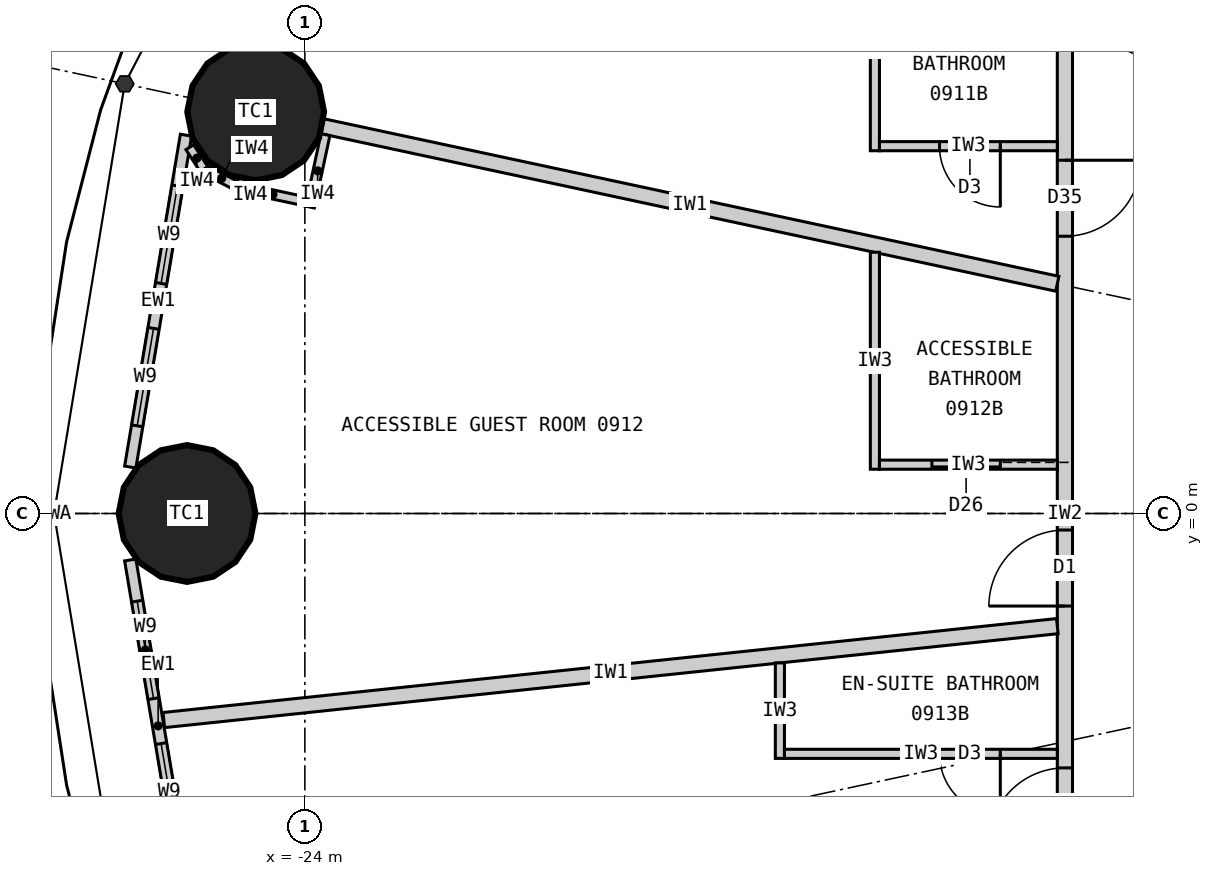
"""IFC4 building model, lengths in metres.
Left out: names, types, materials, properties, quantities, classifications, styles, units other than length and angle.
Written with IfcOpenShell. Run it as: python <this file> out.ifc"""

import sys

from ifc_helpers import new_model, si_unit, direction, frame, frame_2d, origin, origin_2d, place, context, subcontext, project, spatial, rectangle, circle, extrude, element, fill, save


model = new_model("IFC4")
c1 = context("Model", 3, precision=1e-05, world=origin(), true_north=direction((0.0, 1.0)))
c2 = subcontext(c1, "Body", "Model", "MODEL_VIEW")
j1 = project(units=[si_unit("LENGTHUNIT", "METRE"), si_unit("PLANEANGLEUNIT", "RADIAN")], contexts=[c1])
p1 = place(None, origin())
s1 = spatial("IfcSite", under=j1, at=p1, CompositionType="ELEMENT")
p2 = place(p1, origin())
s2 = spatial("IfcBuilding", under=s1, at=p2, CompositionType="ELEMENT")
p3 = place(p2, frame((0.0, 0.0, 42.6)))
s3 = spatial("IfcBuildingStorey", under=s2, at=p3, CompositionType="ELEMENT", Elevation=42.6)
for number, where, z_axis, x_axis in (
    (1, (-24.647, 5.283, 0.0), (0.0, 0.0, 1.0), (1.0, 0.0, 0.0)),
    (2, (-25.55, 0.0, 0.0), (0.0, 0.0, 1.0), (1.0, 0.0, 0.0)),
):
    element("IfcColumn", number, at=place(p3, frame(where, z_axis=z_axis, x_axis=x_axis)), inside=s3, PredefinedType="COLUMN", context=c2, shape_type="SweptSolid", body=[
        extrude(circle(Radius=0.9, at=origin_2d()), origin(), (0.0, 0.0, 1.0), 3.3),
    ])
p4 = place(p3, frame((-25.564, 4.978, 0.0), z_axis=(0.0, 0.0, 1.0), x_axis=(-0.165641751141, -0.986185991727, 0.0)))
e3 = element("IfcWall", 3, at=p4, inside=s3, PredefinedType="ELEMENTEDWALL", context=c2, shape_type="SweptSolid", body=[
    extrude(rectangle(XDim=4.428, YDim=0.15, at=frame_2d((2.214, 0.0))), origin(), (0.0, 0.0, 1.0), 3.05),
])
p5 = place(p4, frame((0.678, 0.0, 0.9)))
e4 = element("IfcOpeningElement", 4, at=p5, cuts=e3, PredefinedType="OPENING", context=c2, shape_type="SweptSolid", body=[
    extrude(rectangle(XDim=1.3, YDim=1.9, at=frame_2d((0.65, 0.95))), frame((0.0, 0.085, 0.0), z_axis=(0.0, -1.0, 0.0), x_axis=(1.0, 0.0, 0.0)), (0.0, 0.0, 1.0), 0.17),
])
p6 = place(p4, frame((2.578, 0.0, 0.9)))
e5 = element("IfcOpeningElement", 5, at=p6, cuts=e3, PredefinedType="OPENING", context=c2, shape_type="SweptSolid", body=[
    extrude(rectangle(XDim=1.3, YDim=1.9, at=frame_2d((0.65, 0.95))), frame((0.0, 0.085, 0.0), z_axis=(0.0, -1.0, 0.0), x_axis=(1.0, 0.0, 0.0)), (0.0, 0.0, 1.0), 0.17),
])
p7 = place(p3, frame((-26.297, -0.611, 0.0), z_axis=(0.0, 0.0, 1.0), x_axis=(0.165641751141, -0.986185991727, 0.0)))
e6 = element("IfcWall", 6, at=p7, inside=s3, PredefinedType="ELEMENTEDWALL", context=c2, shape_type="SweptSolid", body=[
    extrude(rectangle(XDim=4.428, YDim=0.15, at=frame_2d((2.214, 0.0))), origin(), (0.0, 0.0, 1.0), 3.05),
])
p8 = place(p7, frame((0.55, 0.0, 0.9)))
e7 = element("IfcOpeningElement", 7, at=p8, cuts=e6, PredefinedType="OPENING", context=c2, shape_type="SweptSolid", body=[
    extrude(rectangle(XDim=1.3, YDim=1.9, at=frame_2d((0.65, 0.95))), frame((0.0, 0.085, 0.0), z_axis=(0.0, -1.0, 0.0), x_axis=(1.0, 0.0, 0.0)), (0.0, 0.0, 1.0), 0.17),
])
p9 = place(p7, frame((2.45, 0.0, 0.9)))
e8 = element("IfcOpeningElement", 8, at=p9, cuts=e6, PredefinedType="OPENING", context=c2, shape_type="SweptSolid", body=[
    extrude(rectangle(XDim=1.3, YDim=1.9, at=frame_2d((0.65, 0.95))), frame((0.0, 0.085, 0.0), z_axis=(0.0, -1.0, 0.0), x_axis=(1.0, 0.0, 0.0)), (0.0, 0.0, 1.0), 0.17),
])
p10 = place(p3, frame((-14.0, 9.9, 0.0), z_axis=(0.0, 0.0, 1.0), x_axis=(0.0, -1.0, 0.0)))
e9 = element("IfcWall", 9, at=p10, inside=s3, PredefinedType="PARTITIONING", context=c2, shape_type="SweptSolid", body=[
    extrude(rectangle(XDim=19.8, YDim=0.2, at=frame_2d((9.9, 0.0))), origin(), (0.0, 0.0, 1.0), 3.05),
])
p11 = place(p10, frame((0.103, 0.0, 0.0)))
e10 = element("IfcOpeningElement", 10, at=p11, cuts=e9, PredefinedType="OPENING", context=c2, shape_type="SweptSolid", body=[
    extrude(rectangle(XDim=1.0, YDim=2.2, at=frame_2d((0.5, 1.1))), frame((0.0, 0.11, 0.0), z_axis=(0.0, -1.0, 0.0), x_axis=(1.0, 0.0, 0.0)), (0.0, 0.0, 1.0), 0.22),
])
p12 = place(p10, frame((5.252, 0.0, 0.0)))
e11 = element("IfcOpeningElement", 11, at=p12, cuts=e9, PredefinedType="OPENING", context=c2, shape_type="SweptSolid", body=[
    extrude(rectangle(XDim=1.0, YDim=2.0, at=frame_2d((0.5, 1.0))), frame((0.0, 0.11, 0.0), z_axis=(0.0, -1.0, 0.0), x_axis=(1.0, 0.0, 0.0)), (0.0, 0.0, 1.0), 0.22),
])
p13 = place(p10, frame((10.117, 0.0, 0.0)))
e12 = element("IfcOpeningElement", 12, at=p13, cuts=e9, PredefinedType="OPENING", context=c2, shape_type="SweptSolid", body=[
    extrude(rectangle(XDim=1.0, YDim=2.2, at=frame_2d((0.5, 1.1))), frame((0.0, 0.11, 0.0), z_axis=(0.0, -1.0, 0.0), x_axis=(1.0, 0.0, 0.0)), (0.0, 0.0, 1.0), 0.22),
])
p14 = place(p10, frame((13.247, 0.0, 0.0)))
e13 = element("IfcOpeningElement", 13, at=p14, cuts=e9, PredefinedType="OPENING", context=c2, shape_type="SweptSolid", body=[
    extrude(rectangle(XDim=1.0, YDim=2.0, at=frame_2d((0.5, 1.0))), frame((0.0, 0.11, 0.0), z_axis=(0.0, -1.0, 0.0), x_axis=(1.0, 0.0, 0.0)), (0.0, 0.0, 1.0), 0.22),
])
p15 = place(p10, frame((15.679, 0.0, 0.0)))
e14 = element("IfcOpeningElement", 14, at=p15, cuts=e9, PredefinedType="OPENING", context=c2, shape_type="SweptSolid", body=[
    extrude(rectangle(XDim=1.0, YDim=2.2, at=frame_2d((0.5, 1.1))), frame((0.0, 0.11, 0.0), z_axis=(0.0, -1.0, 0.0), x_axis=(1.0, 0.0, 0.0)), (0.0, 0.0, 1.0), 0.22),
])
p16 = place(p3, frame((-14.1, 3.022, 0.0), z_axis=(0.0, 0.0, 1.0), x_axis=(-0.977786510688, 0.209603290805, 0.0)))
e15 = element("IfcWall", 15, at=p16, inside=s3, PredefinedType="PARTITIONING", context=c2, shape_type="SweptSolid", body=[
    extrude(rectangle(XDim=9.887, YDim=0.2, at=frame_2d((4.943, 0.0))), origin(), (0.0, 0.0, 1.0), 2.05),
])
p17 = place(p3, frame((-14.1, -1.482, 0.0), z_axis=(0.0, 0.0, 1.0), x_axis=(-0.994522076235, -0.104526742422, 0.0)))
e16 = element("IfcWall", 16, at=p17, inside=s3, PredefinedType="PARTITIONING", context=c2, shape_type="SweptSolid", body=[
    extrude(rectangle(XDim=11.821, YDim=0.2, at=frame_2d((5.91, 0.0))), origin(), (0.0, 0.0, 1.0), 2.2),
])
p18 = place(p3, frame((-16.5, 7.521, 0.0), z_axis=(0.0, 0.0, 1.0), x_axis=(0.0, -1.0, 0.0)))
e17 = element("IfcWall", 17, at=p18, inside=s3, PredefinedType="PARTITIONING", context=c2, shape_type="SweptSolid", body=[
    extrude(rectangle(XDim=2.749, YDim=0.12, at=frame_2d((1.374, 0.0))), origin(), (0.0, 0.0, 1.0), 3.05),
])
p19 = place(p3, frame((-14.1, 4.833, 0.0), z_axis=(0.0, 0.0, 1.0), x_axis=(-1.0, 0.0, 0.0)))
e18 = element("IfcWall", 18, at=p19, inside=s3, PredefinedType="PARTITIONING", context=c2, shape_type="SweptSolid", body=[
    extrude(rectangle(XDim=2.34, YDim=0.12, at=frame_2d((1.17, 0.0))), origin(), (0.0, 0.0, 1.0), 3.05),
])
p20 = place(p19, frame((0.75, 0.0, 0.0)))
e19 = element("IfcOpeningElement", 19, at=p20, cuts=e18, PredefinedType="OPENING", context=c2, shape_type="SweptSolid", body=[
    extrude(rectangle(XDim=0.8, YDim=2.1, at=frame_2d((0.4, 1.05))), frame((0.0, 0.07, 0.0), z_axis=(0.0, -1.0, 0.0), x_axis=(1.0, 0.0, 0.0)), (0.0, 0.0, 1.0), 0.14),
])
p21 = place(p3, frame((-16.5, 3.437, 0.0), z_axis=(0.0, 0.0, 1.0), x_axis=(0.0, -1.0, 0.0)))
e20 = element("IfcWall", 20, at=p21, inside=s3, PredefinedType="PARTITIONING", context=c2, shape_type="SweptSolid", body=[
    extrude(rectangle(XDim=2.854, YDim=0.12, at=frame_2d((1.427, 0.0))), origin(), (0.0, 0.0, 1.0), 3.05),
])
p22 = place(p3, frame((-14.1, 0.643, 0.0), z_axis=(0.0, 0.0, 1.0), x_axis=(-1.0, 0.0, 0.0)))
e21 = element("IfcWall", 21, at=p22, inside=s3, PredefinedType="PARTITIONING", context=c2, shape_type="SweptSolid", body=[
    extrude(rectangle(XDim=2.34, YDim=0.12, at=frame_2d((1.17, 0.0))), origin(), (0.0, 0.0, 1.0), 3.05),
])
p23 = place(p22, frame((0.75, 0.0, 0.0)))
e22 = element("IfcOpeningElement", 22, at=p23, cuts=e21, PredefinedType="OPENING", context=c2, shape_type="SweptSolid", body=[
    extrude(rectangle(XDim=0.9, YDim=2.1, at=frame_2d((0.45, 1.05))), frame((0.0, 0.07, 0.0), z_axis=(0.0, -1.0, 0.0), x_axis=(1.0, 0.0, 0.0)), (0.0, 0.0, 1.0), 0.14),
])
p24 = place(p3, frame((-17.75, -1.966, 0.0), z_axis=(0.0, 0.0, 1.0), x_axis=(0.0, -1.0, 0.0)))
e23 = element("IfcWall", 23, at=p24, inside=s3, PredefinedType="PARTITIONING", context=c2, shape_type="SweptSolid", body=[
    extrude(rectangle(XDim=1.256, YDim=0.12, at=frame_2d((0.628, 0.0))), origin(), (0.0, 0.0, 1.0), 3.05),
])
p25 = place(p3, frame((-14.1, -3.162, 0.0), z_axis=(0.0, 0.0, 1.0), x_axis=(-1.0, 0.0, 0.0)))
e24 = element("IfcWall", 24, at=p25, inside=s3, PredefinedType="PARTITIONING", context=c2, shape_type="SweptSolid", body=[
    extrude(rectangle(XDim=3.59, YDim=0.12, at=frame_2d((1.795, 0.0))), origin(), (0.0, 0.0, 1.0), 3.05),
])
p26 = place(p25, frame((0.75, 0.0, 0.0)))
e25 = element("IfcOpeningElement", 25, at=p26, cuts=e24, PredefinedType="OPENING", context=c2, shape_type="SweptSolid", body=[
    extrude(rectangle(XDim=0.8, YDim=2.1, at=frame_2d((0.4, 1.05))), frame((0.0, 0.07, 0.0), z_axis=(0.0, -1.0, 0.0), x_axis=(1.0, 0.0, 0.0)), (0.0, 0.0, 1.0), 0.14),
])
p27 = place(p3, frame((-23.729, 4.984, 0.0), z_axis=(0.0, 0.0, 1.0), x_axis=(-0.20968306268, -0.977769406979, 0.0)))
e26 = element("IfcWall", 26, at=p27, inside=s3, PredefinedType="PARTITIONING", context=c2, shape_type="SweptSolid", body=[
    extrude(rectangle(XDim=0.975, YDim=0.12, at=frame_2d((0.487, 0.0))), origin(), (0.0, 0.0, 1.0), 3.05),
])
p28 = place(p3, frame((-23.98, 4.103, 0.0), z_axis=(0.0, 0.0, 1.0), x_axis=(-0.977762694187, 0.209714362543, 0.0)))
e27 = element("IfcWall", 27, at=p28, inside=s3, PredefinedType="PARTITIONING", context=c2, shape_type="SweptSolid", body=[
    extrude(rectangle(XDim=0.9, YDim=0.12, at=frame_2d((0.45, 0.0))), origin(), (0.0, 0.0, 1.0), 3.05),
])
p29 = place(p3, frame((-24.86, 4.291, 0.0), z_axis=(0.0, 0.0, 1.0), x_axis=(-0.890204323062, 0.455561481254, 0.0)))
e28 = element("IfcWall", 28, at=p29, inside=s3, PredefinedType="PARTITIONING", context=c2, shape_type="SweptSolid", body=[
    extrude(rectangle(XDim=0.525, YDim=0.12, at=frame_2d((0.263, 0.0))), origin(), (0.0, 0.0, 1.0), 3.05),
])
p30 = place(p3, frame((-25.327, 4.531, 0.0), z_axis=(0.0, 0.0, 1.0), x_axis=(-0.543516034791, 0.839398784801, 0.0)))
e29 = element("IfcWall", 29, at=p30, inside=s3, PredefinedType="PARTITIONING", context=c2, shape_type="SweptSolid", body=[
    extrude(rectangle(XDim=0.344, YDim=0.12, at=frame_2d((0.172, 0.0))), origin(), (0.0, 0.0, 1.0), 3.05),
])
p31 = place(p5, origin())
e30 = element("IfcWindow", 30, at=p31, inside=s3, PartitioningType="SINGLE_PANEL", PredefinedType="WINDOW", context=c2, shape_type="SweptSolid", body=[
    extrude(rectangle(XDim=1.3, YDim=1.9, at=frame_2d((0.65, 0.95))), frame((0.0, 0.03, 0.0), z_axis=(0.0, -1.0, 0.0), x_axis=(1.0, 0.0, 0.0)), (0.0, 0.0, 1.0), 0.06),
])
fill(e4, e30)
p32 = place(p6, origin())
e31 = element("IfcWindow", 31, at=p32, inside=s3, PartitioningType="SINGLE_PANEL", PredefinedType="WINDOW", context=c2, shape_type="SweptSolid", body=[
    extrude(rectangle(XDim=1.3, YDim=1.9, at=frame_2d((0.65, 0.95))), frame((0.0, 0.03, 0.0), z_axis=(0.0, -1.0, 0.0), x_axis=(1.0, 0.0, 0.0)), (0.0, 0.0, 1.0), 0.06),
])
fill(e5, e31)
p33 = place(p8, origin())
e32 = element("IfcWindow", 32, at=p33, inside=s3, PartitioningType="SINGLE_PANEL", PredefinedType="WINDOW", context=c2, shape_type="SweptSolid", body=[
    extrude(rectangle(XDim=1.3, YDim=1.9, at=frame_2d((0.65, 0.95))), frame((0.0, 0.03, 0.0), z_axis=(0.0, -1.0, 0.0), x_axis=(1.0, 0.0, 0.0)), (0.0, 0.0, 1.0), 0.06),
])
fill(e7, e32)
p34 = place(p9, origin())
e33 = element("IfcWindow", 33, at=p34, inside=s3, PartitioningType="SINGLE_PANEL", PredefinedType="WINDOW", context=c2, shape_type="SweptSolid", body=[
    extrude(rectangle(XDim=1.3, YDim=1.9, at=frame_2d((0.65, 0.95))), frame((0.0, 0.03, 0.0), z_axis=(0.0, -1.0, 0.0), x_axis=(1.0, 0.0, 0.0)), (0.0, 0.0, 1.0), 0.06),
])
fill(e8, e33)
p35 = place(p20, origin())
e34 = element("IfcDoor", 34, at=p35, inside=s3, OperationType="SINGLE_SWING_LEFT", PredefinedType="DOOR", context=c2, shape_type="SweptSolid", body=[
    extrude(rectangle(XDim=0.8, YDim=2.1, at=frame_2d((0.4, 1.05))), frame((0.0, 0.025, 0.0), z_axis=(0.0, -1.0, 0.0), x_axis=(1.0, 0.0, 0.0)), (0.0, 0.0, 1.0), 0.05),
])
fill(e19, e34)
p36 = place(p12, origin())
e35 = element("IfcDoor", 35, at=p36, inside=s3, OperationType="SINGLE_SWING_LEFT", PredefinedType="DOOR", context=c2, shape_type="SweptSolid", body=[
    extrude(rectangle(XDim=1.0, YDim=2.0, at=frame_2d((0.5, 1.0))), frame((0.0, 0.025, 0.0), z_axis=(0.0, -1.0, 0.0), x_axis=(1.0, 0.0, 0.0)), (0.0, 0.0, 1.0), 0.05),
])
fill(e11, e35)
p37 = place(p23, origin())
e36 = element("IfcDoor", 36, at=p37, inside=s3, OperationType="SLIDING_TO_LEFT", PredefinedType="DOOR", context=c2, shape_type="SweptSolid", body=[
    extrude(rectangle(XDim=0.9, YDim=2.1, at=frame_2d((0.45, 1.05))), frame((0.0, 0.025, 0.0), z_axis=(0.0, -1.0, 0.0), x_axis=(1.0, 0.0, 0.0)), (0.0, 0.0, 1.0), 0.05),
])
fill(e22, e36)
p38 = place(p13, origin())
e37 = element("IfcDoor", 37, at=p38, inside=s3, OperationType="SINGLE_SWING_RIGHT", PredefinedType="DOOR", context=c2, shape_type="SweptSolid", body=[
    extrude(rectangle(XDim=1.0, YDim=2.2, at=frame_2d((0.5, 1.1))), frame((0.0, 0.025, 0.0), z_axis=(0.0, -1.0, 0.0), x_axis=(1.0, 0.0, 0.0)), (0.0, 0.0, 1.0), 0.05),
])
fill(e12, e37)
p39 = place(p26, origin())
e38 = element("IfcDoor", 38, at=p39, inside=s3, OperationType="SINGLE_SWING_LEFT", PredefinedType="DOOR", context=c2, shape_type="SweptSolid", body=[
    extrude(rectangle(XDim=0.8, YDim=2.1, at=frame_2d((0.4, 1.05))), frame((0.0, 0.025, 0.0), z_axis=(0.0, -1.0, 0.0), x_axis=(1.0, 0.0, 0.0)), (0.0, 0.0, 1.0), 0.05),
])
fill(e25, e38)
p40 = place(p14, origin())
e39 = element("IfcDoor", 39, at=p40, inside=s3, OperationType="SINGLE_SWING_RIGHT", PredefinedType="DOOR", context=c2, shape_type="SweptSolid", body=[
    extrude(rectangle(XDim=1.0, YDim=2.0, at=frame_2d((0.5, 1.0))), frame((0.0, 0.025, 0.0), z_axis=(0.0, -1.0, 0.0), x_axis=(1.0, 0.0, 0.0)), (0.0, 0.0, 1.0), 0.05),
])
fill(e13, e39)
save(model, sys.argv[1])
